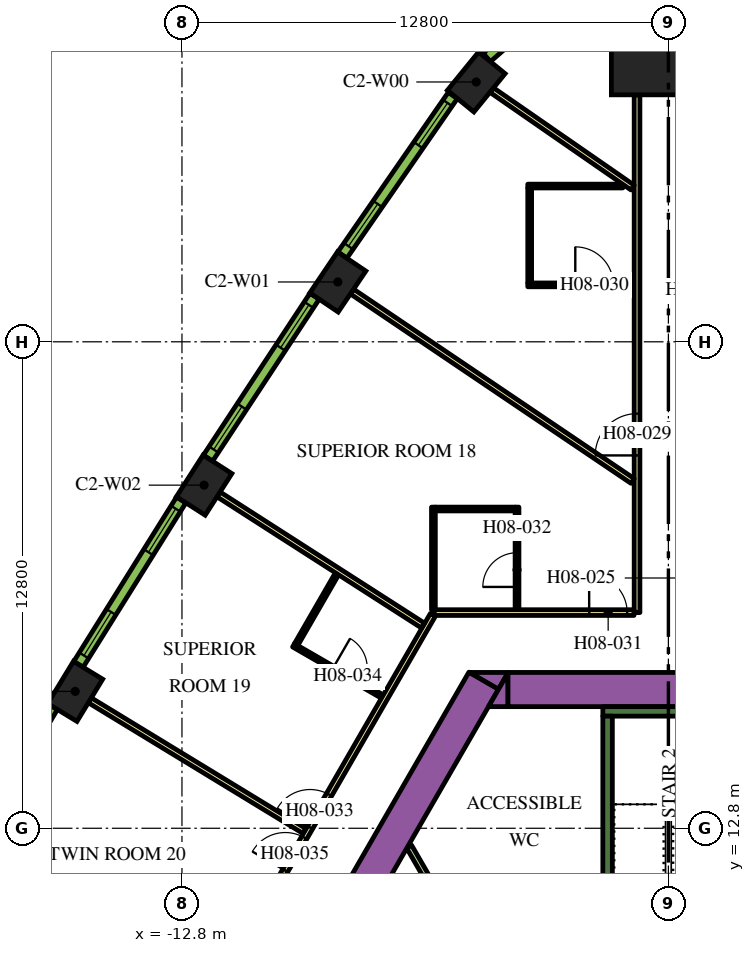
"""IFC4 building model, lengths in metres.
Left out: names, types, materials, properties, quantities, classifications, styles, units other than length and angle.
Written with IfcOpenShell. Run it as: python <this file> out.ifc"""

import sys

from ifc_helpers import new_model, si_unit, direction, frame, frame_2d, origin, origin_2d, place, context, subcontext, project, spatial, polyline, rectangle, outline, extrude, element, fill, save


model = new_model("IFC4")
c1 = context("Model", 3, precision=1e-05, world=origin(), true_north=direction((0.0, 1.0)))
c2 = subcontext(c1, "Body", "Model", "MODEL_VIEW")
j1 = project(units=[si_unit("LENGTHUNIT", "METRE"), si_unit("PLANEANGLEUNIT", "RADIAN")], contexts=[c1])
p1 = place(None, origin())
s1 = spatial("IfcSite", under=j1, at=p1, CompositionType="ELEMENT")
p2 = place(p1, origin())
s2 = spatial("IfcBuilding", under=s1, at=p2, CompositionType="ELEMENT")
p3 = place(p2, frame((0.0, 0.0, 114.9)))
s3 = spatial("IfcBuildingStorey", under=s2, at=p3, CompositionType="ELEMENT", Elevation=114.9)
p4 = place(p3, frame((0.0, 33.598, 0.0), z_axis=(0.0, 0.0, 1.0), x_axis=(0.0, 1.0, 0.0)))
e1 = element("IfcColumn", 1, at=p4, inside=s3, PredefinedType="COLUMN", context=c2, shape_type="SweptSolid", body=[
    extrude(rectangle(XDim=3.0, YDim=3.0, at=origin_2d()), origin(), (0.0, 0.0, 1.0), 3.9),
])
for number, where, z_axis, x_axis in (
    (2, (-5.056, 32.437, 0.0), (0.0, 0.0, 1.0), (-0.632, -0.775, 0.0)),
    (3, (-8.699, 27.174, 0.0), (0.0, 0.0, 1.0), (-0.559, -0.829, 0.0)),
    (4, (-12.217, 21.828, 0.0), (0.0, 0.0, 1.0), (-0.54, -0.842, 0.0)),
    (5, (-15.609, 16.402, 0.0), (0.0, 0.0, 1.0), (-0.52, -0.854, 0.0)),
):
    element("IfcColumn", number, at=place(p3, frame(where, z_axis=z_axis, x_axis=x_axis)), inside=s3, PredefinedType="COLUMN", context=c2, shape_type="SweptSolid", body=[
        extrude(rectangle(XDim=1.3, YDim=0.9, at=origin_2d()), origin(), (0.0, 0.0, 1.0), 3.9),
    ])
p5 = place(p3, frame((-15.36, -1.503, 0.0), z_axis=(0.0, 0.0, 1.0), x_axis=(0.50000389221, 0.866023156604, 0.0)))
e6 = element("IfcWall", 6, at=p5, inside=s3, PredefinedType="SOLIDWALL", context=c2, shape_type="SweptSolid", body=[
    extrude(rectangle(XDim=21.0, YDim=0.9, at=frame_2d((10.5, 0.0))), origin(), (0.0, 0.0, 1.0), 3.9),
])
p6 = place(p3, origin())
e7 = element("IfcWall", 7, at=p6, inside=s3, PredefinedType="SOLIDWALL", context=c2, shape_type="SweptSolid", body=[
    extrude(outline(polyline([(-4.215, 16.9), (-4.469, 16.46), (-5.231, 16.9), (-4.215, 16.9)])), origin(), (0.0, 0.0, 1.0), 3.9),
])
p7 = place(p3, frame((-4.224, 16.45, 0.0), z_axis=(0.0, 0.0, 1.0), x_axis=(1.0, 0.0, 0.0)))
e8 = element("IfcWall", 8, at=p7, inside=s3, PredefinedType="SOLIDWALL", context=c2, shape_type="SweptSolid", body=[
    extrude(rectangle(XDim=9.488, YDim=0.9, at=frame_2d((4.744, 0.0))), origin(), (0.0, 0.0, 1.0), 3.9),
])
e9 = element("IfcWall", 9, at=p6, inside=s3, PredefinedType="SOLIDWALL", context=c2, shape_type="SweptSolid", body=[
    extrude(outline(polyline([(-4.734, 16.0), (-4.226, 16.88), (-4.226, 16.0), (-4.734, 16.0)])), origin(), (0.0, 0.0, 1.0), 3.9),
])
p8 = place(p3, frame((-1.725, 15.875, 0.0), z_axis=(0.0, 0.0, 1.0), x_axis=(1.0, 0.0, 0.0)))
e10 = element("IfcWall", 10, at=p8, inside=s3, PredefinedType="SOLIDWALL", context=c2, shape_type="SweptSolid", body=[
    extrude(rectangle(XDim=3.45, YDim=0.25, at=frame_2d((1.725, 0.0))), origin(), (0.0, 0.0, 1.0), 3.9),
])
p9 = place(p3, frame((-1.6, 8.7, 0.0), z_axis=(0.0, 0.0, 1.0), x_axis=(0.0, 1.0, 0.0)))
e11 = element("IfcWall", 11, at=p9, inside=s3, PredefinedType="SOLIDWALL", context=c2, shape_type="SweptSolid", body=[
    extrude(rectangle(XDim=7.05, YDim=0.25, at=frame_2d((3.525, 0.0))), origin(), (0.0, 0.0, 1.0), 3.9),
])
p10 = place(p3, frame((-6.823, 12.318, 0.0), z_axis=(0.0, 0.0, 1.0), x_axis=(0.500007885066, -0.866020851292, 0.0)))
e12 = element("IfcWall", 12, at=p10, inside=s3, PredefinedType="PARTITIONING", context=c2, shape_type="SweptSolid", body=[
    extrude(rectangle(XDim=4.072, YDim=0.15, at=frame_2d((2.036, 0.0))), origin(), (0.0, 0.0, 1.0), 2.75),
])
p11 = place(p3, frame((-0.825, 18.475, 0.0), z_axis=(0.0, 0.0, 1.0), x_axis=(0.0, 1.0, 0.0)))
e13 = element("IfcWall", 13, at=p11, inside=s3, PredefinedType="PARTITIONING", context=c2, shape_type="SweptSolid", body=[
    extrude(rectangle(XDim=13.623, YDim=0.15, at=frame_2d((6.812, 0.0))), origin(), (0.0, 0.0, 1.0), 2.75),
])
p12 = place(p11, frame((4.135, 0.0, 0.0)))
e14 = element("IfcOpeningElement", 14, at=p12, cuts=e13, PredefinedType="OPENING", context=c2, shape_type="SweptSolid", body=[
    extrude(rectangle(XDim=1.1, YDim=2.1, at=frame_2d((0.55, 1.05))), frame((0.0, 0.085, 0.0), z_axis=(0.0, -1.0, 0.0), x_axis=(1.0, 0.0, 0.0)), (0.0, 0.0, 1.0), 0.17),
])
p13 = place(p3, frame((-6.163, 18.475, 0.0), z_axis=(0.0, 0.0, 1.0), x_axis=(1.0, 0.0, 0.0)))
e15 = element("IfcWall", 15, at=p13, inside=s3, PredefinedType="PARTITIONING", context=c2, shape_type="SweptSolid", body=[
    extrude(rectangle(XDim=5.258, YDim=0.15, at=frame_2d((2.629, 0.0))), origin(), (0.0, 0.0, 1.0), 2.75),
])
p14 = place(p13, frame((4.078, 0.0, 0.0)))
e16 = element("IfcOpeningElement", 16, at=p14, cuts=e15, PredefinedType="OPENING", context=c2, shape_type="SweptSolid", body=[
    extrude(rectangle(XDim=1.0, YDim=2.1, at=frame_2d((0.5, 1.05))), frame((0.0, 0.085, 0.0), z_axis=(0.0, -1.0, 0.0), x_axis=(1.0, 0.0, 0.0)), (0.0, 0.0, 1.0), 0.17),
])
p15 = place(p3, frame((-19.081, -3.9, 0.0), z_axis=(0.0, 0.0, 1.0), x_axis=(0.499998313975, 0.866026377209, 0.0)))
e17 = element("IfcWall", 17, at=p15, inside=s3, PredefinedType="PARTITIONING", context=c2, shape_type="SweptSolid", body=[
    extrude(rectangle(XDim=25.766, YDim=0.15, at=frame_2d((12.883, 0.0))), origin(), (0.0, 0.0, 1.0), 2.75),
])
p16 = place(p15, frame((19.306, 0.0, 0.0)))
e18 = element("IfcOpeningElement", 18, at=p16, cuts=e17, PredefinedType="OPENING", context=c2, shape_type="SweptSolid", body=[
    extrude(rectangle(XDim=1.0, YDim=2.1, at=frame_2d((0.5, 1.05))), frame((0.0, 0.085, 0.0), z_axis=(0.0, -1.0, 0.0), x_axis=(1.0, 0.0, 0.0)), (0.0, 0.0, 1.0), 0.17),
])
p17 = place(p15, frame((18.0, 0.0, 0.0)))
e19 = element("IfcOpeningElement", 19, at=p17, cuts=e17, PredefinedType="OPENING", context=c2, shape_type="SweptSolid", body=[
    extrude(rectangle(XDim=1.0, YDim=2.1, at=frame_2d((0.5, 1.05))), frame((0.0, 0.085, 0.0), z_axis=(0.0, -1.0, 0.0), x_axis=(1.0, 0.0, 0.0)), (0.0, 0.0, 1.0), 0.17),
])
p18 = place(p15, frame((6.838, 0.0, 0.0)))
e20 = element("IfcOpeningElement", 20, at=p18, cuts=e17, PredefinedType="OPENING", context=c2, shape_type="SweptSolid", body=[
    extrude(rectangle(XDim=1.0, YDim=2.1, at=frame_2d((0.5, 1.05))), frame((0.0, 0.085, 0.0), z_axis=(0.0, -1.0, 0.0), x_axis=(1.0, 0.0, 0.0)), (0.0, 0.0, 1.0), 0.17),
])
p19 = place(p15, frame((4.674, 0.0, 0.0)))
e21 = element("IfcOpeningElement", 21, at=p19, cuts=e17, PredefinedType="OPENING", context=c2, shape_type="SweptSolid", body=[
    extrude(rectangle(XDim=0.9, YDim=2.1, at=frame_2d((0.45, 1.05))), frame((0.0, 0.085, 0.0), z_axis=(0.0, -1.0, 0.0), x_axis=(1.0, 0.0, 0.0)), (0.0, 0.0, 1.0), 0.17),
])
p20 = place(p15, frame((0.18, 0.0, 0.0)))
e22 = element("IfcOpeningElement", 22, at=p20, cuts=e17, PredefinedType="OPENING", context=c2, shape_type="SweptSolid", body=[
    extrude(rectangle(XDim=1.0, YDim=2.1, at=frame_2d((0.5, 1.05))), frame((0.0, 0.085, 0.0), z_axis=(0.0, -1.0, 0.0), x_axis=(1.0, 0.0, 0.0)), (0.0, 0.0, 1.0), 0.17),
])
p21 = place(p3, frame((-15.225, 16.167, 0.0), z_axis=(0.0, 0.0, 1.0), x_axis=(0.854088713274, -0.520127359266, 0.0)))
e23 = element("IfcWall", 23, at=p21, inside=s3, PredefinedType="PARTITIONING", context=c2, shape_type="SweptSolid", body=[
    extrude(rectangle(XDim=6.611, YDim=0.15, at=frame_2d((3.305, 0.0))), origin(), (0.0, 0.0, 1.0), 2.75),
])
p22 = place(p3, frame((-11.838, 21.585, 0.0), z_axis=(0.0, 0.0, 1.0), x_axis=(0.841699322813, -0.539946525108, 0.0)))
e24 = element("IfcWall", 24, at=p22, inside=s3, PredefinedType="PARTITIONING", context=c2, shape_type="SweptSolid", body=[
    extrude(rectangle(XDim=6.392, YDim=0.15, at=frame_2d((3.196, 0.0))), origin(), (0.0, 0.0, 1.0), 2.75),
])
p23 = place(p3, frame((-8.326, 26.923, 0.0), z_axis=(0.0, 0.0, 1.0), x_axis=(0.828836601893, -0.5594907393, 0.0)))
e25 = element("IfcWall", 25, at=p23, inside=s3, PredefinedType="PARTITIONING", context=c2, shape_type="SweptSolid", body=[
    extrude(rectangle(XDim=8.909, YDim=0.15, at=frame_2d((4.455, 0.0))), origin(), (0.0, 0.0, 1.0), 2.75),
])
p24 = place(p3, frame((-4.649, 32.223, 0.0), z_axis=(0.0, 0.0, 1.0), x_axis=(0.822262349475, -0.569108626394, 0.0)))
e26 = element("IfcWall", 26, at=p24, inside=s3, PredefinedType="PARTITIONING", context=c2, shape_type="SweptSolid", body=[
    extrude(rectangle(XDim=4.51, YDim=0.15, at=frame_2d((2.255, 0.0))), origin(), (0.0, 0.0, 1.0), 2.75),
])
p25 = place(p3, frame((-3.7, 27.098, 0.0), z_axis=(0.0, 0.0, 1.0), x_axis=(1.0, 0.0, 0.0)))
e27 = element("IfcWall", 27, at=p25, inside=s3, PredefinedType="PARTITIONING", context=c2, shape_type="SweptSolid", body=[
    extrude(rectangle(XDim=2.8, YDim=0.1, at=frame_2d((1.4, 0.0))), origin(), (0.0, 0.0, 1.0), 2.75),
])
p26 = place(p25, frame((1.25, 0.0, 0.0)))
e28 = element("IfcOpeningElement", 28, at=p26, cuts=e27, PredefinedType="OPENING", context=c2, shape_type="SweptSolid", body=[
    extrude(rectangle(XDim=1.0, YDim=2.1, at=frame_2d((0.5, 1.05))), frame((0.0, 0.06, 0.0), z_axis=(0.0, -1.0, 0.0), x_axis=(1.0, 0.0, 0.0)), (0.0, 0.0, 1.0), 0.12),
])
for number, where, z_axis, x_axis in (
    (29, (-3.65, 27.148, 0.0), (0.0, 0.0, 1.0), (0.0, 1.0, 0.0)),
    (30, (-1.2, 29.698, 0.0), (0.0, 0.0, 1.0), (-1.0, 0.0, 0.0)),
):
    element("IfcWall", number, at=place(p3, frame(where, z_axis=z_axis, x_axis=x_axis)), inside=s3, PredefinedType="PARTITIONING", context=c2, shape_type="SweptSolid", body=[
        extrude(rectangle(XDim=2.5, YDim=0.1, at=frame_2d((1.25, 0.0))), origin(), (0.0, 0.0, 1.0), 2.75),
    ])
p27 = place(p3, frame((-3.983, 18.55, 0.0), z_axis=(0.0, 0.0, 1.0), x_axis=(0.0, 1.0, 0.0)))
e31 = element("IfcWall", 31, at=p27, inside=s3, PredefinedType="PARTITIONING", context=c2, shape_type="SweptSolid", body=[
    extrude(rectangle(XDim=2.7, YDim=0.1, at=frame_2d((1.35, 0.0))), origin(), (0.0, 0.0, 1.0), 2.75),
])
p28 = place(p27, frame((0.6, 0.0, 0.0)))
e32 = element("IfcOpeningElement", 32, at=p28, cuts=e31, PredefinedType="OPENING", context=c2, shape_type="SweptSolid", body=[
    extrude(rectangle(XDim=0.9, YDim=2.1, at=frame_2d((0.45, 1.05))), frame((0.0, 0.06, 0.0), z_axis=(0.0, -1.0, 0.0), x_axis=(1.0, 0.0, 0.0)), (0.0, 0.0, 1.0), 0.12),
])
p29 = place(p3, frame((-4.033, 21.2, 0.0), z_axis=(0.0, 0.0, 1.0), x_axis=(-1.0, 0.0, 0.0)))
e33 = element("IfcWall", 33, at=p29, inside=s3, PredefinedType="PARTITIONING", context=c2, shape_type="SweptSolid", body=[
    extrude(rectangle(XDim=2.1, YDim=0.1, at=frame_2d((1.05, 0.0))), origin(), (0.0, 0.0, 1.0), 2.75),
])
p30 = place(p3, frame((-6.183, 18.55, 0.0), z_axis=(0.0, 0.0, 1.0), x_axis=(0.0, 1.0, 0.0)))
e34 = element("IfcWall", 34, at=p30, inside=s3, PredefinedType="PARTITIONING", context=c2, shape_type="SweptSolid", body=[
    extrude(rectangle(XDim=2.7, YDim=0.1, at=frame_2d((1.35, 0.0))), origin(), (0.0, 0.0, 1.0), 2.75),
])
p31 = place(p3, frame((-9.864, 17.615, 0.0), z_axis=(0.0, 0.0, 1.0), x_axis=(0.866019956843, -0.50000943426, 0.0)))
e35 = element("IfcWall", 35, at=p31, inside=s3, PredefinedType="PARTITIONING", context=c2, shape_type="SweptSolid", body=[
    extrude(rectangle(XDim=2.7, YDim=0.1, at=frame_2d((1.35, 0.0))), origin(), (0.0, 0.0, 1.0), 2.75),
])
p32 = place(p31, frame((1.2, 0.0, 0.0)))
e36 = element("IfcOpeningElement", 36, at=p32, cuts=e35, PredefinedType="OPENING", context=c2, shape_type="SweptSolid", body=[
    extrude(rectangle(XDim=0.9, YDim=2.1, at=frame_2d((0.45, 1.05))), frame((0.0, 0.06, 0.0), z_axis=(0.0, -1.0, 0.0), x_axis=(1.0, 0.0, 0.0)), (0.0, 0.0, 1.0), 0.12),
])
p33 = place(p3, frame((-9.796, 17.633, 0.0), z_axis=(0.0, 0.0, 1.0), x_axis=(0.499961633463, 0.866047553582, 0.0)))
e37 = element("IfcWall", 37, at=p33, inside=s3, PredefinedType="PARTITIONING", context=c2, shape_type="SweptSolid", body=[
    extrude(rectangle(XDim=2.15, YDim=0.1, at=frame_2d((1.075, 0.0))), origin(), (0.0, 0.0, 1.0), 2.75),
])
p34 = place(p3, frame((-3.405, 34.275, 0.0), z_axis=(0.0, 0.0, 1.0), x_axis=(-0.754882764627, -0.655859749999, 0.0)))
e38 = element("IfcWall", 38, at=p34, inside=s3, PredefinedType="SOLIDWALL", context=c2, shape_type="SweptSolid", body=[
    extrude(rectangle(XDim=1.82, YDim=0.29, at=frame_2d((0.91, 0.0))), origin(), (0.0, 0.0, 1.0), 3.65),
])
p35 = place(p34, frame((0.46, 0.0, 0.9)))
e39 = element("IfcOpeningElement", 39, at=p35, cuts=e38, PredefinedType="OPENING", context=c2, shape_type="SweptSolid", body=[
    extrude(rectangle(XDim=0.9, YDim=2.15, at=frame_2d((0.45, 1.075))), frame((0.0, 0.155, 0.0), z_axis=(0.0, -1.0, 0.0), x_axis=(1.0, 0.0, 0.0)), (0.0, 0.0, 1.0), 0.31),
])
p36 = place(p3, frame((-5.673, 32.081, 0.0), z_axis=(0.0, 0.0, 1.0), x_axis=(-0.569113019126, -0.822259309136, 0.0)))
e40 = element("IfcWall", 40, at=p36, inside=s3, PredefinedType="SOLIDWALL", context=c2, shape_type="SweptSolid", body=[
    extrude(rectangle(XDim=5.107, YDim=0.29, at=frame_2d((2.553, 0.0))), origin(), (0.0, 0.0, 1.0), 3.65),
])
p37 = place(p36, frame((0.24, 0.0, 0.9)))
e41 = element("IfcOpeningElement", 41, at=p37, cuts=e40, PredefinedType="OPENING", context=c2, shape_type="SweptSolid", body=[
    extrude(rectangle(XDim=1.35, YDim=2.15, at=frame_2d((0.675, 1.075))), frame((0.0, 0.155, 0.0), z_axis=(0.0, -1.0, 0.0), x_axis=(1.0, 0.0, 0.0)), (0.0, 0.0, 1.0), 0.31),
])
p38 = place(p36, frame((3.471, 0.0, 0.9)))
e42 = element("IfcOpeningElement", 42, at=p38, cuts=e40, PredefinedType="OPENING", context=c2, shape_type="SweptSolid", body=[
    extrude(rectangle(XDim=1.35, YDim=2.15, at=frame_2d((0.675, 1.075))), frame((0.0, 0.155, 0.0), z_axis=(0.0, -1.0, 0.0), x_axis=(1.0, 0.0, 0.0)), (0.0, 0.0, 1.0), 0.31),
])
p39 = place(p3, frame((-9.311, 26.799, 0.0), z_axis=(0.0, 0.0, 1.0), x_axis=(-0.549741341923, -0.835334937005, 0.0)))
e43 = element("IfcWall", 43, at=p39, inside=s3, PredefinedType="SOLIDWALL", context=c2, shape_type="SweptSolid", body=[
    extrude(rectangle(XDim=5.1, YDim=0.29, at=frame_2d((2.55, 0.0))), origin(), (0.0, 0.0, 1.0), 3.65),
])
p40 = place(p39, frame((0.273, 0.0, 0.9)))
e44 = element("IfcOpeningElement", 44, at=p40, cuts=e43, PredefinedType="OPENING", context=c2, shape_type="SweptSolid", body=[
    extrude(rectangle(XDim=1.35, YDim=2.15, at=frame_2d((0.675, 1.075))), frame((0.0, 0.155, 0.0), z_axis=(0.0, -1.0, 0.0), x_axis=(1.0, 0.0, 0.0)), (0.0, 0.0, 1.0), 0.31),
])
p41 = place(p39, frame((3.478, 0.0, 0.9)))
e45 = element("IfcOpeningElement", 45, at=p41, cuts=e43, PredefinedType="OPENING", context=c2, shape_type="SweptSolid", body=[
    extrude(rectangle(XDim=1.35, YDim=2.15, at=frame_2d((0.675, 1.075))), frame((0.0, 0.155, 0.0), z_axis=(0.0, -1.0, 0.0), x_axis=(1.0, 0.0, 0.0)), (0.0, 0.0, 1.0), 0.31),
])
p42 = place(p3, frame((-12.82, 21.439, 0.0), z_axis=(0.0, 0.0, 1.0), x_axis=(-0.530072082134, -0.847952585787, 0.0)))
e46 = element("IfcWall", 46, at=p42, inside=s3, PredefinedType="SOLIDWALL", context=c2, shape_type="SweptSolid", body=[
    extrude(rectangle(XDim=5.1, YDim=0.29, at=frame_2d((2.55, 0.0))), origin(), (0.0, 0.0, 1.0), 3.65),
])
p43 = place(p42, frame((0.273, 0.0, 0.9)))
e47 = element("IfcOpeningElement", 47, at=p43, cuts=e46, PredefinedType="OPENING", context=c2, shape_type="SweptSolid", body=[
    extrude(rectangle(XDim=1.35, YDim=2.15, at=frame_2d((0.675, 1.075))), frame((0.0, 0.155, 0.0), z_axis=(0.0, -1.0, 0.0), x_axis=(1.0, 0.0, 0.0)), (0.0, 0.0, 1.0), 0.31),
])
p44 = place(p42, frame((3.478, 0.0, 0.9)))
e48 = element("IfcOpeningElement", 48, at=p44, cuts=e46, PredefinedType="OPENING", context=c2, shape_type="SweptSolid", body=[
    extrude(rectangle(XDim=1.35, YDim=2.15, at=frame_2d((0.675, 1.075))), frame((0.0, 0.155, 0.0), z_axis=(0.0, -1.0, 0.0), x_axis=(1.0, 0.0, 0.0)), (0.0, 0.0, 1.0), 0.31),
])
p45 = place(p3, frame((-16.203, 15.998, 0.0), z_axis=(0.0, 0.0, 1.0), x_axis=(-0.510054281659, -0.860142214847, 0.0)))
e49 = element("IfcWall", 49, at=p45, inside=s3, PredefinedType="SOLIDWALL", context=c2, shape_type="SweptSolid", body=[
    extrude(rectangle(XDim=5.101, YDim=0.29, at=frame_2d((2.55, 0.0))), origin(), (0.0, 0.0, 1.0), 3.65),
])
p46 = place(p45, frame((0.273, 0.0, 0.9)))
e50 = element("IfcOpeningElement", 50, at=p46, cuts=e49, PredefinedType="OPENING", context=c2, shape_type="SweptSolid", body=[
    extrude(rectangle(XDim=1.35, YDim=2.15, at=frame_2d((0.675, 1.075))), frame((0.0, 0.155, 0.0), z_axis=(0.0, -1.0, 0.0), x_axis=(1.0, 0.0, 0.0)), (0.0, 0.0, 1.0), 0.31),
])
p47 = place(p45, frame((3.478, 0.0, 0.9)))
e51 = element("IfcOpeningElement", 51, at=p47, cuts=e49, PredefinedType="OPENING", context=c2, shape_type="SweptSolid", body=[
    extrude(rectangle(XDim=1.35, YDim=2.15, at=frame_2d((0.675, 1.075))), frame((0.0, 0.155, 0.0), z_axis=(0.0, -1.0, 0.0), x_axis=(1.0, 0.0, 0.0)), (0.0, 0.0, 1.0), 0.31),
])
p48 = place(p12, origin())
e52 = element("IfcDoor", 52, at=p48, inside=s3, OperationType="SINGLE_SWING_LEFT", PredefinedType="DOOR", context=c2, shape_type="SweptSolid", body=[
    extrude(rectangle(XDim=1.1, YDim=2.1, at=frame_2d((0.55, 1.05))), frame((0.0, 0.025, 0.0), z_axis=(0.0, -1.0, 0.0), x_axis=(1.0, 0.0, 0.0)), (0.0, 0.0, 1.0), 0.05),
])
fill(e14, e52)
p49 = place(p26, origin())
e53 = element("IfcDoor", 53, at=p49, inside=s3, OperationType="SINGLE_SWING_LEFT", PredefinedType="DOOR", context=c2, shape_type="SweptSolid", body=[
    extrude(rectangle(XDim=1.0, YDim=2.1, at=frame_2d((0.5, 1.05))), frame((0.0, 0.025, 0.0), z_axis=(0.0, -1.0, 0.0), x_axis=(1.0, 0.0, 0.0)), (0.0, 0.0, 1.0), 0.05),
])
fill(e28, e53)
p50 = place(p14, origin())
e54 = element("IfcDoor", 54, at=p50, inside=s3, OperationType="SINGLE_SWING_RIGHT", PredefinedType="DOOR", context=c2, shape_type="SweptSolid", body=[
    extrude(rectangle(XDim=1.0, YDim=2.1, at=frame_2d((0.5, 1.05))), frame((0.0, 0.025, 0.0), z_axis=(0.0, -1.0, 0.0), x_axis=(1.0, 0.0, 0.0)), (0.0, 0.0, 1.0), 0.05),
])
fill(e16, e54)
p51 = place(p28, origin())
e55 = element("IfcDoor", 55, at=p51, inside=s3, OperationType="SINGLE_SWING_RIGHT", PredefinedType="DOOR", context=c2, shape_type="SweptSolid", body=[
    extrude(rectangle(XDim=0.9, YDim=2.1, at=frame_2d((0.45, 1.05))), frame((0.0, 0.025, 0.0), z_axis=(0.0, -1.0, 0.0), x_axis=(1.0, 0.0, 0.0)), (0.0, 0.0, 1.0), 0.05),
])
fill(e32, e55)
p52 = place(p16, origin())
e56 = element("IfcDoor", 56, at=p52, inside=s3, OperationType="SINGLE_SWING_LEFT", PredefinedType="DOOR", context=c2, shape_type="SweptSolid", body=[
    extrude(rectangle(XDim=1.0, YDim=2.1, at=frame_2d((0.5, 1.05))), frame((0.0, 0.025, 0.0), z_axis=(0.0, -1.0, 0.0), x_axis=(1.0, 0.0, 0.0)), (0.0, 0.0, 1.0), 0.05),
])
fill(e18, e56)
p53 = place(p32, origin())
e57 = element("IfcDoor", 57, at=p53, inside=s3, OperationType="SINGLE_SWING_LEFT", PredefinedType="DOOR", context=c2, shape_type="SweptSolid", body=[
    extrude(rectangle(XDim=0.9, YDim=2.1, at=frame_2d((0.45, 1.05))), frame((0.0, 0.025, 0.0), z_axis=(0.0, -1.0, 0.0), x_axis=(1.0, 0.0, 0.0)), (0.0, 0.0, 1.0), 0.05),
])
fill(e36, e57)
p54 = place(p17, origin())
e58 = element("IfcDoor", 58, at=p54, inside=s3, OperationType="SINGLE_SWING_RIGHT", PredefinedType="DOOR", context=c2, shape_type="SweptSolid", body=[
    extrude(rectangle(XDim=1.0, YDim=2.1, at=frame_2d((0.5, 1.05))), frame((0.0, 0.025, 0.0), z_axis=(0.0, -1.0, 0.0), x_axis=(1.0, 0.0, 0.0)), (0.0, 0.0, 1.0), 0.05),
])
fill(e19, e58)
p55 = place(p37, origin())
e59 = element("IfcWindow", 59, at=p55, inside=s3, PartitioningType="DOUBLE_PANEL_VERTICAL", PredefinedType="WINDOW", context=c2, shape_type="SweptSolid", body=[
    extrude(rectangle(XDim=1.35, YDim=2.15, at=frame_2d((0.675, 1.075))), frame((0.0, 0.015, 0.0), z_axis=(0.0, -1.0, 0.0), x_axis=(1.0, 0.0, 0.0)), (0.0, 0.0, 1.0), 0.06),
])
fill(e41, e59)
p56 = place(p38, origin())
e60 = element("IfcWindow", 60, at=p56, inside=s3, PartitioningType="DOUBLE_PANEL_VERTICAL", PredefinedType="WINDOW", context=c2, shape_type="SweptSolid", body=[
    extrude(rectangle(XDim=1.35, YDim=2.15, at=frame_2d((0.675, 1.075))), frame((0.0, 0.015, 0.0), z_axis=(0.0, -1.0, 0.0), x_axis=(1.0, 0.0, 0.0)), (0.0, 0.0, 1.0), 0.06),
])
fill(e42, e60)
p57 = place(p40, origin())
e61 = element("IfcWindow", 61, at=p57, inside=s3, PartitioningType="DOUBLE_PANEL_VERTICAL", PredefinedType="WINDOW", context=c2, shape_type="SweptSolid", body=[
    extrude(rectangle(XDim=1.35, YDim=2.15, at=frame_2d((0.675, 1.075))), frame((0.0, 0.015, 0.0), z_axis=(0.0, -1.0, 0.0), x_axis=(1.0, 0.0, 0.0)), (0.0, 0.0, 1.0), 0.06),
])
fill(e44, e61)
p58 = place(p41, origin())
e62 = element("IfcWindow", 62, at=p58, inside=s3, PartitioningType="DOUBLE_PANEL_VERTICAL", PredefinedType="WINDOW", context=c2, shape_type="SweptSolid", body=[
    extrude(rectangle(XDim=1.35, YDim=2.15, at=frame_2d((0.675, 1.075))), frame((0.0, 0.015, 0.0), z_axis=(0.0, -1.0, 0.0), x_axis=(1.0, 0.0, 0.0)), (0.0, 0.0, 1.0), 0.06),
])
fill(e45, e62)
p59 = place(p43, origin())
e63 = element("IfcWindow", 63, at=p59, inside=s3, PartitioningType="DOUBLE_PANEL_VERTICAL", PredefinedType="WINDOW", context=c2, shape_type="SweptSolid", body=[
    extrude(rectangle(XDim=1.35, YDim=2.15, at=frame_2d((0.675, 1.075))), frame((0.0, 0.015, 0.0), z_axis=(0.0, -1.0, 0.0), x_axis=(1.0, 0.0, 0.0)), (0.0, 0.0, 1.0), 0.06),
])
fill(e47, e63)
p60 = place(p44, origin())
e64 = element("IfcWindow", 64, at=p60, inside=s3, PartitioningType="DOUBLE_PANEL_VERTICAL", PredefinedType="WINDOW", context=c2, shape_type="SweptSolid", body=[
    extrude(rectangle(XDim=1.35, YDim=2.15, at=frame_2d((0.675, 1.075))), frame((0.0, 0.015, 0.0), z_axis=(0.0, -1.0, 0.0), x_axis=(1.0, 0.0, 0.0)), (0.0, 0.0, 1.0), 0.06),
])
fill(e48, e64)
save(model, sys.argv[1])
